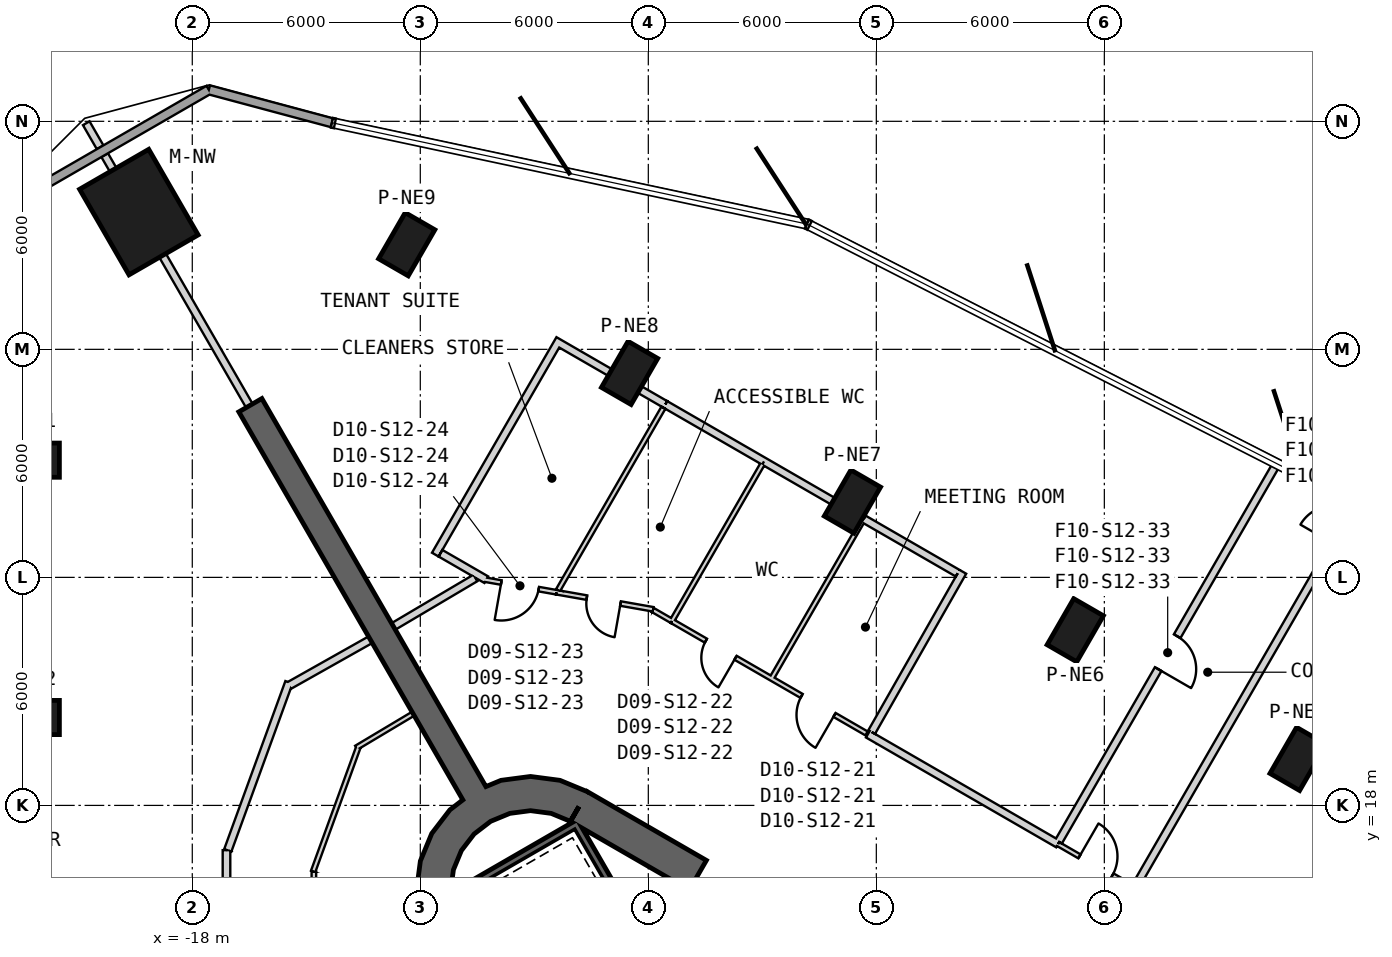
"""IFC4 building model, lengths in metres.
Left out: names, types, materials, properties, quantities, classifications, styles, units other than length and angle.
Written with IfcOpenShell. Run it as: python <this file> out.ifc"""

import sys

from ifc_helpers import new_model, si_unit, direction, frame, frame_2d, origin, origin_2d, place, context, subcontext, project, spatial, polyline, rectangle, outline, extrude, element, fill, save


model = new_model("IFC4")
c1 = context("Model", 3, precision=1e-05, world=origin(), true_north=direction((0.0, 1.0)))
c2 = subcontext(c1, "Body", "Model", "MODEL_VIEW")
j1 = project(units=[si_unit("LENGTHUNIT", "METRE"), si_unit("PLANEANGLEUNIT", "RADIAN")], contexts=[c1])
p1 = place(None, origin())
s1 = spatial("IfcSite", under=j1, at=p1, CompositionType="ELEMENT")
p2 = place(p1, origin())
s2 = spatial("IfcBuilding", under=s1, at=p2, CompositionType="ELEMENT")
p3 = place(p2, frame((0.0, 0.0, 205.2)))
s3 = spatial("IfcBuildingStorey", under=s2, at=p3, CompositionType="ELEMENT", Elevation=205.2)
p4 = place(p3, frame((-19.406, 33.611, 0.0), z_axis=(0.0, 0.0, 1.0), x_axis=(-0.5, 0.866025403784, 0.0)))
e1 = element("IfcColumn", 1, at=p4, inside=s3, PredefinedType="COLUMN", context=c2, shape_type="SweptSolid", body=[
    extrude(rectangle(XDim=2.6, YDim=2.1, at=origin_2d()), origin(), (0.0, 0.0, 1.0), 4.0),
])
for number, where, z_axis, x_axis in (
    (2, (-22.197, 27.084, 0.0), (0.0, 0.0, 1.0), (-1.0, 0.0, 0.0)),
    (3, (-22.197, 20.313, 0.0), (0.0, 0.0, 1.0), (-1.0, 0.0, 0.0)),
    (4, (11.098, 19.223, 0.0), (0.0, 0.0, 1.0), (0.5, 0.866, 0.0)),
    (5, (5.235, 22.609, 0.0), (0.0, 0.0, 1.0), (0.5, 0.866, 0.0)),
    (6, (-0.629, 25.994, 0.0), (0.0, 0.0, 1.0), (0.5, 0.866, 0.0)),
    (7, (-6.493, 29.38, 0.0), (0.0, 0.0, 1.0), (0.5, 0.866, 0.0)),
    (8, (-12.357, 32.765, 0.0), (0.0, 0.0, 1.0), (0.5, 0.866, 0.0)),
):
    element("IfcColumn", number, at=place(p3, frame(where, z_axis=z_axis, x_axis=x_axis)), inside=s3, PredefinedType="COLUMN", context=c2, shape_type="SweptSolid", body=[
        extrude(rectangle(XDim=1.4, YDim=0.9, at=origin_2d()), origin(), (0.0, 0.0, 1.0), 4.0),
    ])
p5 = place(p3, frame((19.475, 2.208, 0.0), z_axis=(0.0, 0.0, 1.0), x_axis=(-0.866028369851, 0.499994862586, 0.0)))
e9 = element("IfcWall", 9, at=p5, inside=s3, PredefinedType="SHEAR", context=c2, shape_type="SweptSolid", body=[
    extrude(rectangle(XDim=31.523, YDim=0.9, at=frame_2d((15.762, 0.0))), origin(), (0.0, 0.0, 1.0), 4.0),
])
p6 = place(p5, frame((7.062, 0.0, 0.0)))
e10 = element("IfcOpeningElement", 10, at=p6, cuts=e9, PredefinedType="OPENING", context=c2, shape_type="SweptSolid", body=[
    extrude(rectangle(XDim=1.2, YDim=2.4, at=frame_2d((0.6, 1.2))), frame((0.0, 0.46, 0.0), z_axis=(0.0, -1.0, 0.0), x_axis=(1.0, 0.0, 0.0)), (0.0, 0.0, 1.0), 0.92),
])
p7 = place(p5, frame((3.612, 0.0, 0.0)))
e11 = element("IfcOpeningElement", 11, at=p7, cuts=e9, PredefinedType="OPENING", context=c2, shape_type="SweptSolid", body=[
    extrude(rectangle(XDim=1.2, YDim=2.4, at=frame_2d((0.6, 1.2))), frame((0.0, 0.46, 0.0), z_axis=(0.0, -1.0, 0.0), x_axis=(1.0, 0.0, 0.0)), (0.0, 0.0, 1.0), 0.92),
])
p8 = place(p5, frame((26.712, 0.0, 0.0)))
e12 = element("IfcOpeningElement", 12, at=p8, cuts=e9, PredefinedType="OPENING", context=c2, shape_type="SweptSolid", body=[
    extrude(rectangle(XDim=1.2, YDim=2.4, at=frame_2d((0.6, 1.2))), frame((0.0, 0.46, 0.0), z_axis=(0.0, -1.0, 0.0), x_axis=(1.0, 0.0, 0.0)), (0.0, 0.0, 1.0), 0.92),
])
p9 = place(p3, origin())
e13 = element("IfcWall", 13, at=p9, inside=s3, PredefinedType="SHEAR", context=c2, shape_type="SweptSolid", body=[
    extrude(outline(polyline([(-7.6, 18.36), (-8.323, 18.659), (-9.1, 18.762), (-9.876, 18.659), (-10.6, 18.36), (-11.221, 17.883), (-11.698, 17.262), (-11.998, 16.538), (-12.1, 15.762), (-11.2, 15.762), (-11.128, 16.305), (-10.919, 16.812), (-10.585, 17.247), (-10.15, 17.58), (-9.644, 17.79), (-9.1, 17.862), (-8.556, 17.79), (-8.05, 17.58), (-7.6, 18.36)])), origin(), (0.0, 0.0, 1.0), 4.0),
])
p10 = place(p3, frame((-10.575, 18.316, 0.0), z_axis=(0.0, 0.0, 1.0), x_axis=(-0.499999598486, 0.866025635599, 0.0)))
e14 = element("IfcWall", 14, at=p10, inside=s3, PredefinedType="SHEAR", context=c2, shape_type="SweptSolid", body=[
    extrude(rectangle(XDim=11.794, YDim=0.7, at=frame_2d((5.897, 0.0))), origin(), (0.0, 0.0, 1.0), 4.0),
])
p11 = place(p3, frame((-14.326, 35.963, 0.0), z_axis=(0.0, 0.0, 1.0), x_axis=(-0.965927247937, 0.258813739382, 0.0)))
e15 = element("IfcWall", 15, at=p11, inside=s3, PredefinedType="SOLIDWALL", context=c2, shape_type="SweptSolid", body=[
    extrude(rectangle(XDim=3.353, YDim=0.24, at=frame_2d((1.676, 0.0))), origin(), (0.0, 0.0, 1.0), 3.7),
])
p12 = place(p3, frame((-17.564, 36.831, 0.0), z_axis=(0.0, 0.0, 1.0), x_axis=(-0.86602381473, -0.500002752313, 0.0)))
e16 = element("IfcWall", 16, at=p12, inside=s3, PredefinedType="SOLIDWALL", context=c2, shape_type="SweptSolid", body=[
    extrude(rectangle(XDim=6.409, YDim=0.24, at=frame_2d((3.204, 0.0))), origin(), (0.0, 0.0, 1.0), 3.7),
])
p13 = place(p3, frame((-7.818, 17.541, -0.3), z_axis=(0.0, 0.0, 1.0), x_axis=(-0.866044365799, -0.499967155389, 0.0)))
e17 = element("IfcWall", 17, at=p13, inside=s3, PredefinedType="SHEAR", context=c2, shape_type="SweptSolid", body=[
    extrude(rectangle(XDim=3.8, YDim=0.2, at=frame_2d((1.9, 0.0))), origin(), (0.0, 0.0, 1.0), 4.0),
])
p14 = place(p3, frame((-7.854, 17.405, -0.3), z_axis=(0.0, 0.0, 1.0), x_axis=(0.499997992926, -0.866026562566, 0.0)))
e18 = element("IfcWall", 18, at=p14, inside=s3, PredefinedType="SHEAR", context=c2, shape_type="SweptSolid", body=[
    extrude(rectangle(XDim=7.9, YDim=0.2, at=frame_2d((3.95, 0.0))), origin(), (0.0, 0.0, 1.0), 4.0),
])
p15 = place(p3, frame((-12.189, 20.411, 0.0), z_axis=(0.0, 0.0, 1.0), x_axis=(-0.858492721014, -0.51282574815, 0.0)))
e19 = element("IfcWall", 19, at=p15, inside=s3, PredefinedType="PARTITIONING", context=c2, shape_type="SweptSolid", body=[
    extrude(rectangle(XDim=1.742, YDim=0.12, at=frame_2d((0.871, 0.0))), origin(), (0.0, 0.0, 1.0), 3.7),
])
p16 = place(p3, frame((-13.631, 19.53, 0.0), z_axis=(0.0, 0.0, 1.0), x_axis=(-0.342069878069, -0.939674517329, 0.0)))
e20 = element("IfcWall", 20, at=p16, inside=s3, PredefinedType="PARTITIONING", context=c2, shape_type="SweptSolid", body=[
    extrude(rectangle(XDim=3.479, YDim=0.12, at=frame_2d((1.739, 0.0))), origin(), (0.0, 0.0, 1.0), 2.78),
])
p17 = place(p3, frame((-14.8, 16.257, 0.0), z_axis=(0.0, 0.0, 1.0), x_axis=(-0.001847148781, -0.999998294019, 0.0)))
e21 = element("IfcWall", 21, at=p17, inside=s3, PredefinedType="PARTITIONING", context=c2, shape_type="SweptSolid", body=[
    extrude(rectangle(XDim=16.257, YDim=0.12, at=frame_2d((8.128, 0.0))), origin(), (0.0, 0.0, 1.0), 2.88),
])
p18 = place(p17, frame((7.629, 0.0, 0.0)))
e22 = element("IfcOpeningElement", 22, at=p18, cuts=e21, PredefinedType="OPENING", context=c2, shape_type="SweptSolid", body=[
    extrude(rectangle(XDim=1.0, YDim=2.1, at=frame_2d((0.5, 1.05))), frame((0.0, 0.07, 0.0), z_axis=(0.0, -1.0, 0.0), x_axis=(1.0, 0.0, 0.0)), (0.0, 0.0, 1.0), 0.14),
])
p19 = place(p3, frame((-17.1, 16.823, 0.0), z_axis=(0.0, 0.0, 1.0), x_axis=(0.0, -1.0, 0.0)))
e23 = element("IfcWall", 23, at=p19, inside=s3, PredefinedType="PARTITIONING", context=c2, shape_type="SweptSolid", body=[
    extrude(rectangle(XDim=12.473, YDim=0.2, at=frame_2d((6.236, 0.0))), origin(), (0.0, 0.0, 1.0), 2.88),
])
p20 = place(p19, frame((5.776, 0.0, 0.0)))
e24 = element("IfcOpeningElement", 24, at=p20, cuts=e23, PredefinedType="OPENING", context=c2, shape_type="SweptSolid", body=[
    extrude(rectangle(XDim=1.0, YDim=2.1, at=frame_2d((0.5, 1.05))), frame((0.0, 0.11, 0.0), z_axis=(0.0, -1.0, 0.0), x_axis=(1.0, 0.0, 0.0)), (0.0, 0.0, 1.0), 0.22),
])
p21 = place(p3, frame((-15.456, 21.239, 0.0), z_axis=(0.0, 0.0, 1.0), x_axis=(-0.34205546997, -0.939679762187, 0.0)))
e25 = element("IfcWall", 25, at=p21, inside=s3, PredefinedType="PARTITIONING", context=c2, shape_type="SweptSolid", body=[
    extrude(rectangle(XDim=4.706, YDim=0.2, at=frame_2d((2.353, 0.0))), origin(), (0.0, 0.0, 1.0), 2.78),
])
p22 = place(p3, frame((-13.313, 22.359, 0.0), z_axis=(0.0, 0.0, 1.0), x_axis=(-0.87121710687, -0.490897904555, 0.0)))
e26 = element("IfcWall", 26, at=p22, inside=s3, PredefinedType="PARTITIONING", context=c2, shape_type="SweptSolid", body=[
    extrude(rectangle(XDim=2.457, YDim=0.2, at=frame_2d((1.229, 0.0))), origin(), (0.0, 0.0, 1.0), 3.7),
])
p23 = place(p3, frame((4.783, 16.984, 0.0), z_axis=(0.0, 0.0, 1.0), x_axis=(0.866007057882, -0.500031774688, 0.0)))
e27 = element("IfcWall", 27, at=p23, inside=s3, PredefinedType="PARTITIONING", context=c2, shape_type="SweptSolid", body=[
    extrude(rectangle(XDim=2.3, YDim=0.12, at=frame_2d((1.15, 0.0))), origin(), (0.0, 0.0, 1.0), 3.7),
])
p24 = place(p23, frame((0.65, 0.0, 0.0)))
e28 = element("IfcOpeningElement", 28, at=p24, cuts=e27, PredefinedType="OPENING", context=c2, shape_type="SweptSolid", body=[
    extrude(rectangle(XDim=1.0, YDim=2.1, at=frame_2d((0.5, 1.05))), frame((0.0, 0.07, 0.0), z_axis=(0.0, -1.0, 0.0), x_axis=(1.0, 0.0, 0.0)), (0.0, 0.0, 1.0), 0.14),
])
p25 = place(p3, frame((4.783, 16.984, 0.0), z_axis=(0.0, 0.0, 1.0), x_axis=(-0.866032949645, 0.499986929959, 0.0)))
e29 = element("IfcWall", 29, at=p25, inside=s3, PredefinedType="PARTITIONING", context=c2, shape_type="SweptSolid", body=[
    extrude(rectangle(XDim=5.78, YDim=0.2, at=frame_2d((2.89, 0.0))), origin(), (0.0, 0.0, 1.0), 3.07),
])
p26 = place(p3, frame((-10.55, 23.985, 0.0), z_axis=(0.0, 0.0, 1.0), x_axis=(-0.860742216303, -0.509041095663, 0.0)))
e30 = element("IfcWall", 30, at=p26, inside=s3, PredefinedType="PARTITIONING", context=c2, shape_type="SweptSolid", body=[
    extrude(rectangle(XDim=2.506, YDim=0.2, at=frame_2d((1.253, 0.0))), origin(), (0.0, 0.0, 1.0), 3.7),
])
p27 = place(p3, frame((-0.258, 19.894, 0.0), z_axis=(0.0, 0.0, 1.0), x_axis=(-0.866014429462, 0.500019007602, 0.0)))
e31 = element("IfcWall", 31, at=p27, inside=s3, PredefinedType="PARTITIONING", context=c2, shape_type="SweptSolid", body=[
    extrude(rectangle(XDim=5.915, YDim=0.12, at=frame_2d((2.958, 0.0))), origin(), (0.0, 0.0, 1.0), 2.88),
])
p28 = place(p27, frame((0.974, 0.0, 0.0)))
e32 = element("IfcOpeningElement", 32, at=p28, cuts=e31, PredefinedType="OPENING", context=c2, shape_type="SweptSolid", body=[
    extrude(rectangle(XDim=1.0, YDim=2.1, at=frame_2d((0.5, 1.05))), frame((0.0, 0.07, 0.0), z_axis=(0.0, -1.0, 0.0), x_axis=(1.0, 0.0, 0.0)), (0.0, 0.0, 1.0), 0.14),
])
p29 = place(p27, frame((3.981, 0.0, 0.0)))
e33 = element("IfcOpeningElement", 33, at=p29, cuts=e31, PredefinedType="OPENING", context=c2, shape_type="SweptSolid", body=[
    extrude(rectangle(XDim=0.9, YDim=2.1, at=frame_2d((0.45, 1.05))), frame((0.0, 0.07, 0.0), z_axis=(0.0, -1.0, 0.0), x_axis=(1.0, 0.0, 0.0)), (0.0, 0.0, 1.0), 0.14),
])
p30 = place(p3, frame((-5.38, 22.852, 0.0), z_axis=(0.0, 0.0, 1.0), x_axis=(-0.866129309467, 0.499819986878, 0.0)))
e34 = element("IfcWall", 34, at=p30, inside=s3, PredefinedType="PARTITIONING", context=c2, shape_type="SweptSolid", body=[
    extrude(rectangle(XDim=0.578, YDim=0.12, at=frame_2d((0.289, 0.0))), origin(), (0.0, 0.0, 1.0), 3.7),
])
p31 = place(p3, frame((-5.873, 23.16, 0.0), z_axis=(0.0, 0.0, 1.0), x_axis=(-0.984810190637, 0.173634352644, 0.0)))
e35 = element("IfcWall", 35, at=p31, inside=s3, PredefinedType="PARTITIONING", context=c2, shape_type="SweptSolid", body=[
    extrude(rectangle(XDim=2.583, YDim=0.12, at=frame_2d((1.292, 0.0))), origin(), (0.0, 0.0, 1.0), 3.7),
])
p32 = place(p31, frame((0.872, 0.0, 0.0)))
e36 = element("IfcOpeningElement", 36, at=p32, cuts=e35, PredefinedType="OPENING", context=c2, shape_type="SweptSolid", body=[
    extrude(rectangle(XDim=0.9, YDim=2.1, at=frame_2d((0.45, 1.05))), frame((0.0, 0.07, 0.0), z_axis=(0.0, -1.0, 0.0), x_axis=(1.0, 0.0, 0.0)), (0.0, 0.0, 1.0), 0.14),
])
p33 = place(p3, frame((-8.417, 23.608, 0.0), z_axis=(0.0, 0.0, 1.0), x_axis=(-0.984793637517, 0.173728211601, 0.0)))
e37 = element("IfcWall", 37, at=p33, inside=s3, PredefinedType="PARTITIONING", context=c2, shape_type="SweptSolid", body=[
    extrude(rectangle(XDim=1.95, YDim=0.12, at=frame_2d((0.975, 0.0))), origin(), (0.0, 0.0, 1.0), 2.78),
])
p34 = place(p33, frame((0.475, 0.0, 0.0)))
e38 = element("IfcOpeningElement", 38, at=p34, cuts=e37, PredefinedType="OPENING", context=c2, shape_type="SweptSolid", body=[
    extrude(rectangle(XDim=1.0, YDim=2.1, at=frame_2d((0.5, 1.05))), frame((0.0, 0.07, 0.0), z_axis=(0.0, -1.0, 0.0), x_axis=(1.0, 0.0, 0.0)), (0.0, 0.0, 1.0), 0.14),
])
p35 = place(p3, frame((-16.498, 28.515, 0.0), z_axis=(0.0, 0.0, 1.0), x_axis=(-0.499997018584, 0.866027125099, 0.0)))
e39 = element("IfcWall", 39, at=p35, inside=s3, PredefinedType="PARTITIONING", context=c2, shape_type="SweptSolid", body=[
    extrude(rectangle(XDim=4.567, YDim=0.2, at=frame_2d((2.283, 0.0))), origin(), (0.0, 0.0, 1.0), 3.27),
])
p36 = place(p3, frame((-20.082, 34.722, 0.0), z_axis=(0.0, 0.0, 1.0), x_axis=(-0.500132045864, 0.865949153646, 0.0)))
e40 = element("IfcWall", 40, at=p36, inside=s3, PredefinedType="PARTITIONING", context=c2, shape_type="SweptSolid", body=[
    extrude(rectangle(XDim=0.447, YDim=0.2, at=frame_2d((0.224, 0.0))), origin(), (0.0, 0.0, 1.0), 3.7),
])
p37 = place(p3, frame((-20.425, 35.317, 0.0), z_axis=(0.0, 0.0, 1.0), x_axis=(-0.499876722092, 0.86609656662, 0.0)))
e41 = element("IfcWall", 41, at=p37, inside=s3, PredefinedType="PARTITIONING", context=c2, shape_type="SweptSolid", body=[
    extrude(rectangle(XDim=0.731, YDim=0.2, at=frame_2d((0.365, 0.0))), origin(), (0.0, 0.0, 1.0), 3.7),
])
p38 = place(p3, frame((6.822, 15.876, 0.0), z_axis=(0.0, 0.0, 1.0), x_axis=(0.499996172356, 0.866027613664, 0.0)))
e42 = element("IfcWall", 42, at=p38, inside=s3, PredefinedType="PARTITIONING", context=c2, shape_type="SweptSolid", body=[
    extrude(rectangle(XDim=11.607, YDim=0.2, at=frame_2d((5.803, 0.0))), origin(), (0.0, 0.0, 1.0), 3.7),
])
p39 = place(p38, frame((10.407, 0.0, 0.0)))
e43 = element("IfcOpeningElement", 43, at=p39, cuts=e42, PredefinedType="OPENING", context=c2, shape_type="SweptSolid", body=[
    extrude(rectangle(XDim=1.0, YDim=2.1, at=frame_2d((0.5, 1.05))), frame((0.0, 0.11, 0.0), z_axis=(0.0, -1.0, 0.0), x_axis=(1.0, 0.0, 0.0)), (0.0, 0.0, 1.0), 0.22),
])
p40 = place(p3, frame((10.538, 26.992, 0.0), z_axis=(0.0, 0.0, 1.0), x_axis=(-0.500002753014, -0.866023814325, 0.0)))
e44 = element("IfcWall", 44, at=p40, inside=s3, PredefinedType="PARTITIONING", context=c2, shape_type="SweptSolid", body=[
    extrude(rectangle(XDim=11.485, YDim=0.2, at=frame_2d((5.743, 0.0))), origin(), (0.0, 0.0, 1.0), 3.7),
])
p41 = place(p40, frame((5.243, 0.0, 0.0)))
e45 = element("IfcOpeningElement", 45, at=p41, cuts=e44, PredefinedType="OPENING", context=c2, shape_type="SweptSolid", body=[
    extrude(rectangle(XDim=1.0, YDim=2.1, at=frame_2d((0.5, 1.05))), frame((0.0, 0.11, 0.0), z_axis=(0.0, -1.0, 0.0), x_axis=(1.0, 0.0, 0.0)), (0.0, 0.0, 1.0), 0.22),
])
p42 = place(p3, frame((2.278, 24.146, 0.0), z_axis=(0.0, 0.0, 1.0), x_axis=(-0.494609479201, -0.869115333592, 0.0)))
e46 = element("IfcWall", 46, at=p42, inside=s3, PredefinedType="PARTITIONING", context=c2, shape_type="SweptSolid", body=[
    extrude(rectangle(XDim=4.85, YDim=0.2, at=frame_2d((2.425, 0.0))), origin(), (0.0, 0.0, 1.0), 3.7),
])
p43 = place(p3, frame((-8.467, 30.234, 0.0), z_axis=(0.0, 0.0, 1.0), x_axis=(0.866011654119, -0.500023814363, 0.0)))
e47 = element("IfcWall", 47, at=p43, inside=s3, PredefinedType="PARTITIONING", context=c2, shape_type="SweptSolid", body=[
    extrude(rectangle(XDim=3.366, YDim=0.2, at=frame_2d((1.683, 0.0))), origin(), (0.0, 0.0, 1.0), 3.7),
])
p44 = place(p3, frame((-5.552, 28.551, 0.0), z_axis=(0.0, 0.0, 1.0), x_axis=(0.866040543018, -0.499973777161, 0.0)))
e48 = element("IfcWall", 48, at=p44, inside=s3, PredefinedType="PARTITIONING", context=c2, shape_type="SweptSolid", body=[
    extrude(rectangle(XDim=2.999, YDim=0.2, at=frame_2d((1.5, 0.0))), origin(), (0.0, 0.0, 1.0), 3.7),
])
p45 = place(p3, frame((-2.955, 27.052, 0.0), z_axis=(0.0, 0.0, 1.0), x_axis=(0.865996229516, -0.50005052791, 0.0)))
e49 = element("IfcWall", 49, at=p45, inside=s3, PredefinedType="PARTITIONING", context=c2, shape_type="SweptSolid", body=[
    extrude(rectangle(XDim=3.028, YDim=0.2, at=frame_2d((1.514, 0.0))), origin(), (0.0, 0.0, 1.0), 3.7),
])
p46 = place(p3, frame((-0.333, 25.538, 0.0), z_axis=(0.0, 0.0, 1.0), x_axis=(0.866063225885, -0.499934484477, 0.0)))
e50 = element("IfcWall", 50, at=p46, inside=s3, PredefinedType="PARTITIONING", context=c2, shape_type="SweptSolid", body=[
    extrude(rectangle(XDim=2.857, YDim=0.2, at=frame_2d((1.429, 0.0))), origin(), (0.0, 0.0, 1.0), 3.7),
])
p47 = place(p3, frame((-8.431, 30.098, 0.0), z_axis=(0.0, 0.0, 1.0), x_axis=(-0.500005339912, -0.866022320763, 0.0)))
e51 = element("IfcWall", 51, at=p47, inside=s3, PredefinedType="PARTITIONING", context=c2, shape_type="SweptSolid", body=[
    extrude(rectangle(XDim=6.35, YDim=0.2, at=frame_2d((3.175, 0.0))), origin(), (0.0, 0.0, 1.0), 2.78),
])
p48 = place(p3, frame((-11.469, 24.635, 0.0), z_axis=(0.0, 0.0, 1.0), x_axis=(0.866030639775, -0.499990930889, 0.0)))
e52 = element("IfcWall", 52, at=p48, inside=s3, PredefinedType="PARTITIONING", context=c2, shape_type="SweptSolid", body=[
    extrude(rectangle(XDim=1.391, YDim=0.2, at=frame_2d((0.695, 0.0))), origin(), (0.0, 0.0, 1.0), 3.7),
])
p49 = place(p3, frame((-2.728, 21.39, 0.0), z_axis=(0.0, 0.0, 1.0), x_axis=(0.500007844523, 0.866020874699, 0.0)))
e53 = element("IfcWall", 53, at=p49, inside=s3, PredefinedType="PARTITIONING", context=c2, shape_type="SweptSolid", body=[
    extrude(rectangle(XDim=4.69, YDim=0.12, at=frame_2d((2.345, 0.0))), origin(), (0.0, 0.0, 1.0), 2.98),
])
p50 = place(p3, frame((-5.35, 22.903, 0.0), z_axis=(0.0, 0.0, 1.0), x_axis=(0.499985303776, 0.866033888487, 0.0)))
e54 = element("IfcWall", 54, at=p50, inside=s3, PredefinedType="PARTITIONING", context=c2, shape_type="SweptSolid", body=[
    extrude(rectangle(XDim=4.69, YDim=0.12, at=frame_2d((2.345, 0.0))), origin(), (0.0, 0.0, 1.0), 2.88),
])
p51 = place(p3, frame((-8.375, 23.662, 0.0), z_axis=(0.0, 0.0, 1.0), x_axis=(0.500031131263, 0.866007429395, 0.0)))
e55 = element("IfcWall", 55, at=p51, inside=s3, PredefinedType="PARTITIONING", context=c2, shape_type="SweptSolid", body=[
    extrude(rectangle(XDim=5.546, YDim=0.12, at=frame_2d((2.773, 0.0))), origin(), (0.0, 0.0, 1.0), 2.88),
])
p52 = place(p24, origin())
e56 = element("IfcDoor", 56, at=p52, inside=s3, OperationType="SINGLE_SWING_LEFT", PredefinedType="NOTDEFINED", context=c2, shape_type="SweptSolid", body=[
    extrude(rectangle(XDim=1.0, YDim=2.1, at=frame_2d((0.5, 1.05))), frame((0.0, 0.025, 0.0), z_axis=(0.0, -1.0, 0.0), x_axis=(1.0, 0.0, 0.0)), (0.0, 0.0, 1.0), 0.05),
])
fill(e28, e56)
p53 = place(p28, origin())
e57 = element("IfcDoor", 57, at=p53, inside=s3, OperationType="SINGLE_SWING_LEFT", PredefinedType="NOTDEFINED", context=c2, shape_type="SweptSolid", body=[
    extrude(rectangle(XDim=1.0, YDim=2.1, at=frame_2d((0.5, 1.05))), frame((0.0, 0.025, 0.0), z_axis=(0.0, -1.0, 0.0), x_axis=(1.0, 0.0, 0.0)), (0.0, 0.0, 1.0), 0.05),
])
fill(e32, e57)
p54 = place(p29, origin())
e58 = element("IfcDoor", 58, at=p54, inside=s3, OperationType="SINGLE_SWING_LEFT", PredefinedType="NOTDEFINED", context=c2, shape_type="SweptSolid", body=[
    extrude(rectangle(XDim=0.9, YDim=2.1, at=frame_2d((0.45, 1.05))), frame((0.0, 0.025, 0.0), z_axis=(0.0, -1.0, 0.0), x_axis=(1.0, 0.0, 0.0)), (0.0, 0.0, 1.0), 0.05),
])
fill(e33, e58)
p55 = place(p32, origin())
e59 = element("IfcDoor", 59, at=p55, inside=s3, OperationType="SINGLE_SWING_RIGHT", PredefinedType="NOTDEFINED", context=c2, shape_type="SweptSolid", body=[
    extrude(rectangle(XDim=0.9, YDim=2.1, at=frame_2d((0.45, 1.05))), frame((0.0, 0.025, 0.0), z_axis=(0.0, -1.0, 0.0), x_axis=(1.0, 0.0, 0.0)), (0.0, 0.0, 1.0), 0.05),
])
fill(e36, e59)
p56 = place(p34, origin())
e60 = element("IfcDoor", 60, at=p56, inside=s3, OperationType="SINGLE_SWING_RIGHT", PredefinedType="NOTDEFINED", context=c2, shape_type="SweptSolid", body=[
    extrude(rectangle(XDim=1.0, YDim=2.1, at=frame_2d((0.5, 1.05))), frame((0.0, 0.025, 0.0), z_axis=(0.0, -1.0, 0.0), x_axis=(1.0, 0.0, 0.0)), (0.0, 0.0, 1.0), 0.05),
])
fill(e38, e60)
p57 = place(p41, origin())
e61 = element("IfcDoor", 61, at=p57, inside=s3, OperationType="SINGLE_SWING_LEFT", PredefinedType="USERDEFINED", context=c2, shape_type="SweptSolid", body=[
    extrude(rectangle(XDim=1.0, YDim=2.1, at=frame_2d((0.5, 1.05))), frame((0.0, 0.025, 0.0), z_axis=(0.0, -1.0, 0.0), x_axis=(1.0, 0.0, 0.0)), (0.0, 0.0, 1.0), 0.05),
])
fill(e45, e61)
p58 = place(p8, origin())
e62 = element("IfcDoor", 62, at=p58, inside=s3, OperationType="SINGLE_SWING_RIGHT", PredefinedType="USERDEFINED", context=c2, shape_type="SweptSolid", body=[
    extrude(rectangle(XDim=1.2, YDim=2.4, at=frame_2d((0.6, 1.2))), frame((0.0, 0.025, 0.0), z_axis=(0.0, -1.0, 0.0), x_axis=(1.0, 0.0, 0.0)), (0.0, 0.0, 1.0), 0.05),
])
fill(e12, e62)
save(model, sys.argv[1])
